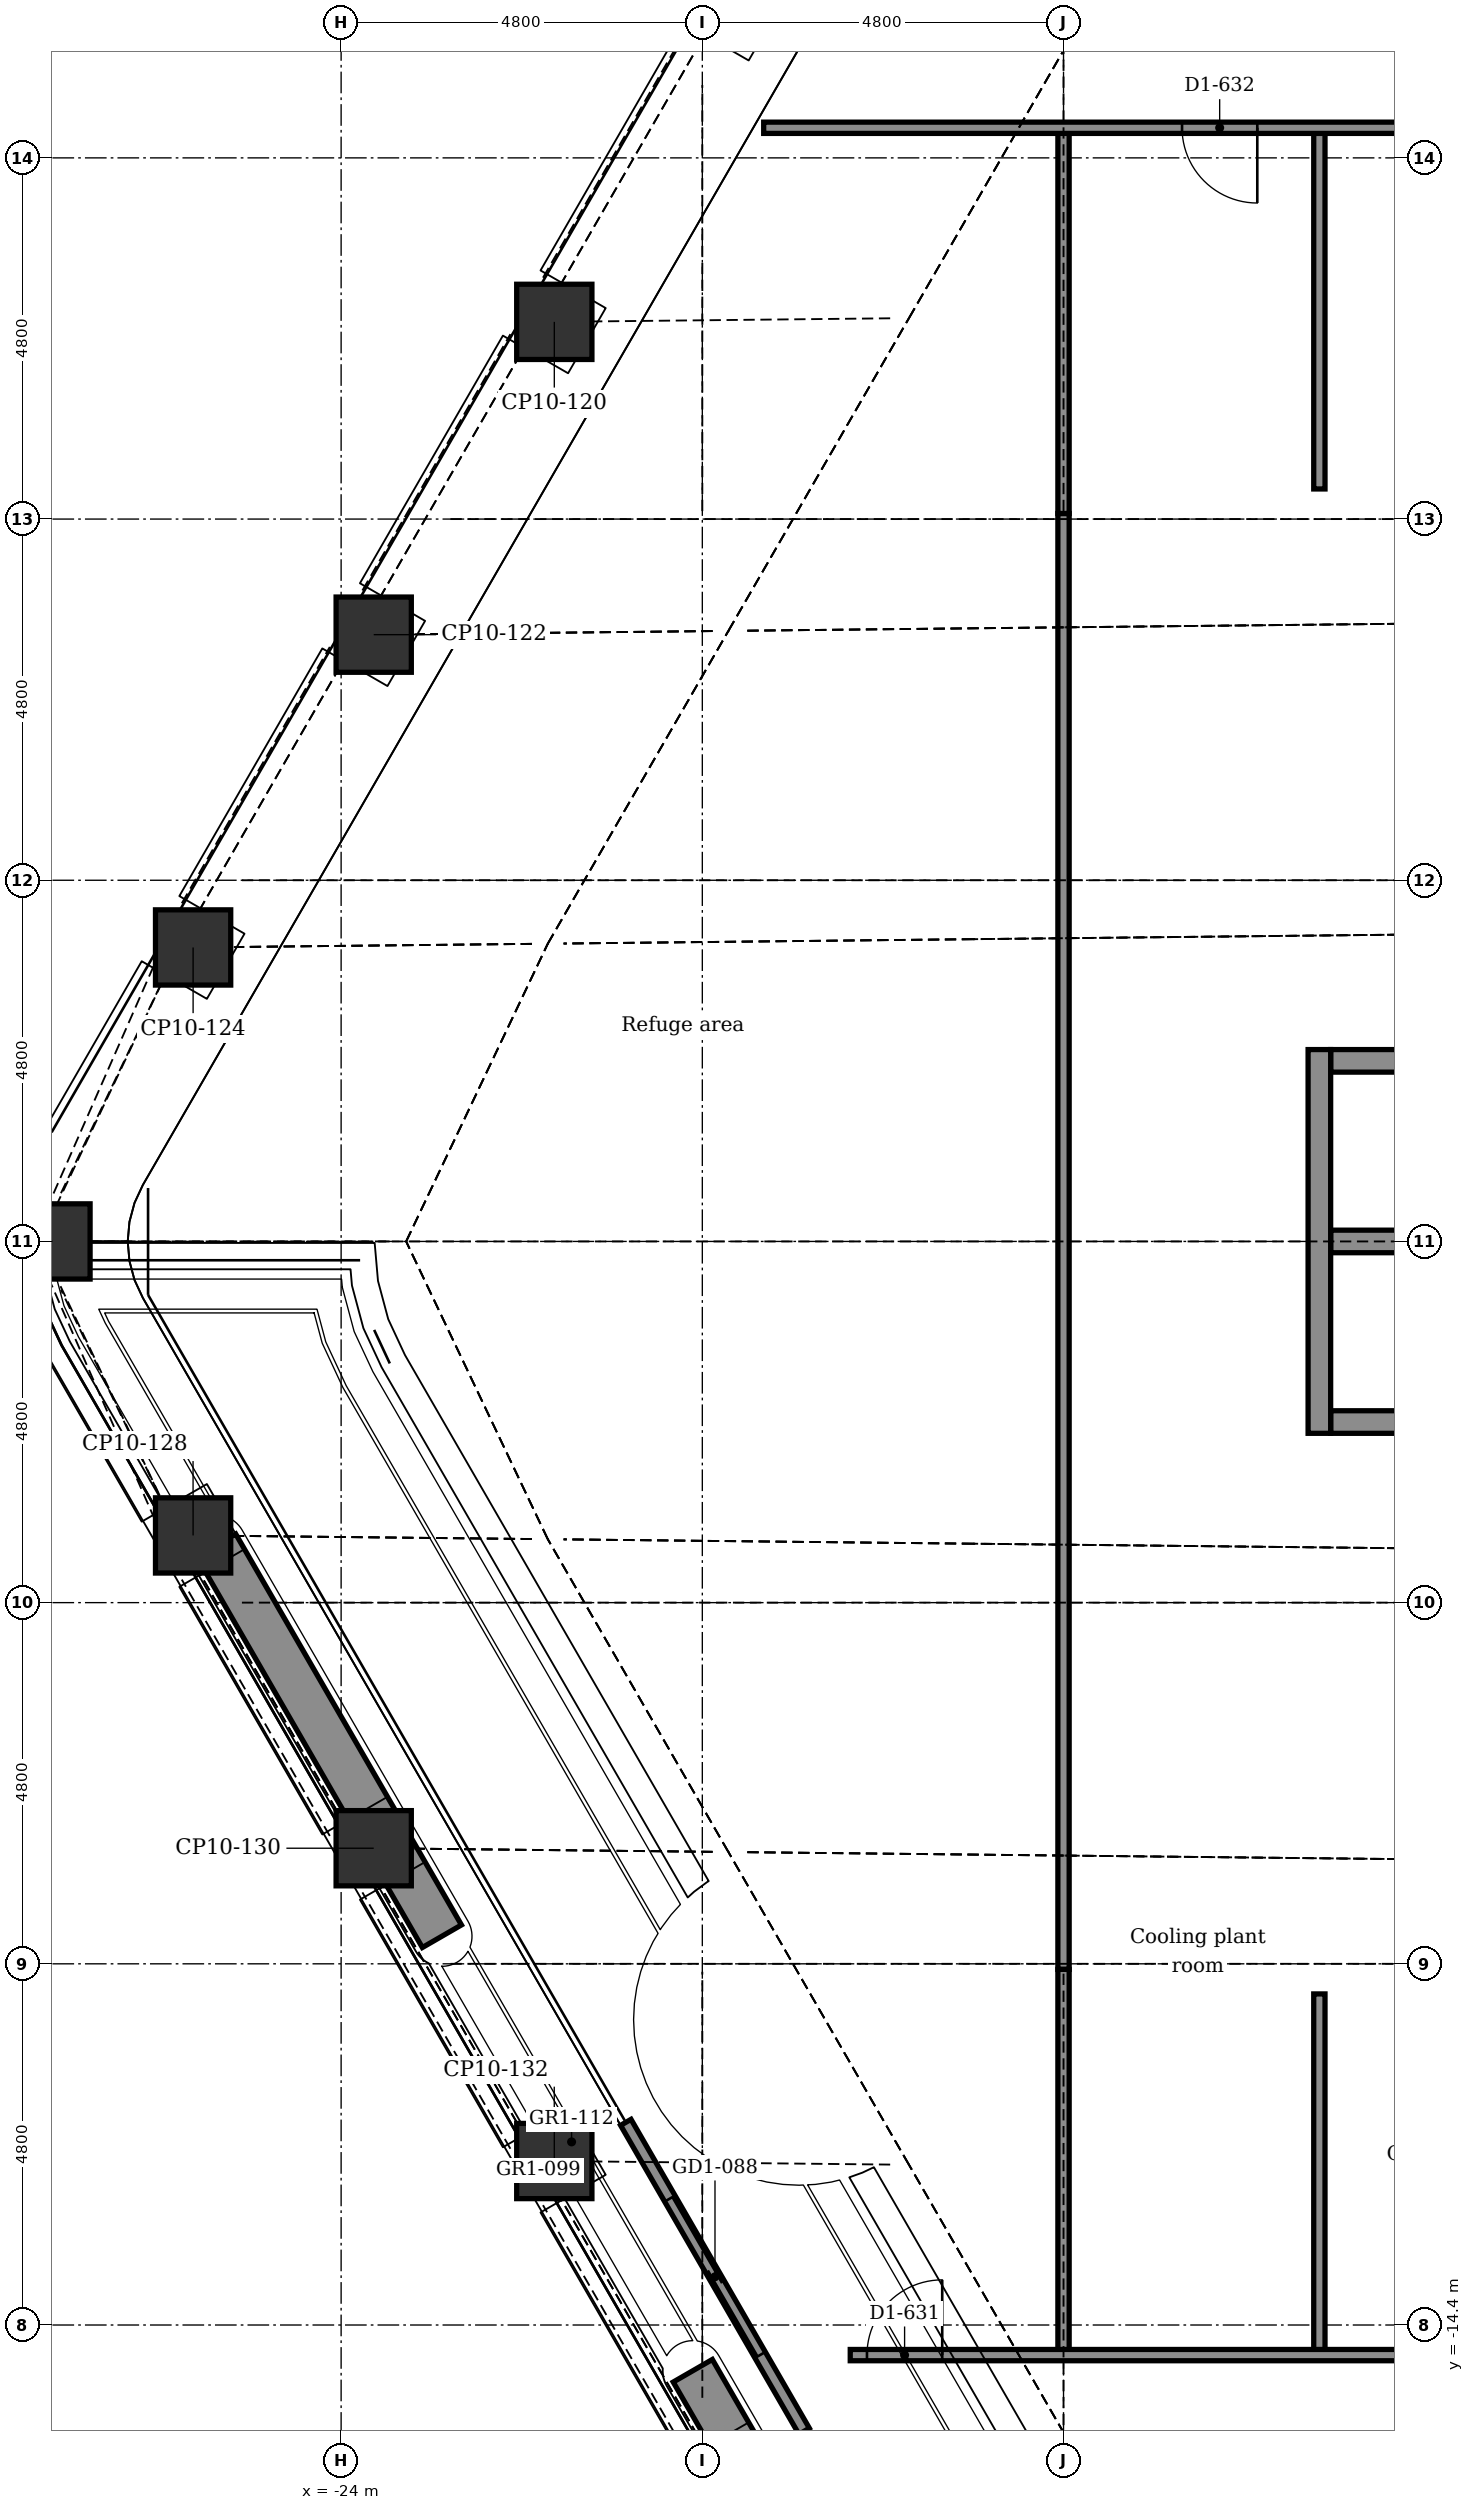
"""IFC4 building model, lengths in metres.
Left out: names, types, materials, properties, quantities, classifications, styles, units other than length and angle.
Written with IfcOpenShell. Run it as: python <this file> out.ifc"""

import sys

from ifc_helpers import new_model, si_unit, direction, frame, frame_2d, origin, origin_2d, place, context, subcontext, project, spatial, rectangle, extrude, element, fill, save


model = new_model("IFC4")
c1 = context("Model", 3, precision=1e-05, world=origin(), true_north=direction((0.0, 1.0)))
c2 = subcontext(c1, "Body", "Model", "MODEL_VIEW")
j1 = project(units=[si_unit("LENGTHUNIT", "METRE"), si_unit("PLANEANGLEUNIT", "RADIAN")], contexts=[c1])
p1 = place(None, origin())
s1 = spatial("IfcSite", under=j1, at=p1, CompositionType="ELEMENT")
p2 = place(p1, origin())
s2 = spatial("IfcBuilding", under=s1, at=p2, CompositionType="ELEMENT")
p3 = place(p2, frame((0.0, 0.0, 216.8)))
s3 = spatial("IfcBuildingStorey", under=s2, at=p3, CompositionType="ELEMENT", Elevation=216.8)
for number, where, z_axis, x_axis in (
    (1, (-18.767, -16.378, -0.3), (0.0, 0.0, 1.0), (0.866, 0.5, 0.0)),
    (2, (-21.167, -12.221, -0.3), (0.0, 0.0, 1.0), (0.866, 0.5, 0.0)),
    (3, (-23.567, -8.064, -0.3), (0.0, 0.0, 1.0), (0.866, 0.5, 0.0)),
    (4, (-25.967, -3.907, -0.3), (0.0, 0.0, 1.0), (0.866, 0.5, 0.0)),
    (5, (-27.836, 0.0, -0.3), (0.0, 0.0, 1.0), (1.0, 0.0, 0.0)),
    (6, (-25.967, 3.907, -0.3), (0.0, 0.0, 1.0), (0.5, 0.866, 0.0)),
    (7, (-23.567, 8.064, -0.3), (0.0, 0.0, 1.0), (0.5, 0.866, 0.0)),
    (8, (-21.167, 12.221, -0.3), (0.0, 0.0, 1.0), (0.5, 0.866, 0.0)),
    (9, (-18.767, 16.378, -0.3), (0.0, 0.0, 1.0), (0.5, 0.866, 0.0)),
):
    element("IfcColumn", number, at=place(p3, frame(where, z_axis=z_axis, x_axis=x_axis)), inside=s3, PredefinedType="COLUMN", context=c2, shape_type="SweptSolid", body=[
        extrude(rectangle(XDim=1.0, YDim=1.0, at=origin_2d()), origin(), (0.0, 0.0, 1.0), 6.15),
    ])
p4 = place(p3, frame((-10.85, -2.4, -0.3), z_axis=(0.0, 0.0, 1.0), x_axis=(1.0, 0.0, 0.0)))
e10 = element("IfcWall", 10, at=p4, inside=s3, PredefinedType="STANDARD", context=c2, shape_type="SweptSolid", body=[
    extrude(rectangle(XDim=1.1, YDim=0.3, at=frame_2d((0.55, 0.0))), origin(), (0.0, 0.0, 1.0), 6.15),
])
p5 = place(p3, frame((-10.85, 0.0, -0.3), z_axis=(0.0, 0.0, 1.0), x_axis=(1.0, 0.0, 0.0)))
e11 = element("IfcWall", 11, at=p5, inside=s3, PredefinedType="STANDARD", context=c2, shape_type="SweptSolid", body=[
    extrude(rectangle(XDim=3.3, YDim=0.3, at=frame_2d((1.65, 0.0))), origin(), (0.0, 0.0, 1.0), 6.15),
])
p6 = place(p3, frame((-10.85, 2.4, -0.3), z_axis=(0.0, 0.0, 1.0), x_axis=(1.0, 0.0, 0.0)))
e12 = element("IfcWall", 12, at=p6, inside=s3, PredefinedType="STANDARD", context=c2, shape_type="SweptSolid", body=[
    extrude(rectangle(XDim=1.1, YDim=0.3, at=frame_2d((0.55, 0.0))), origin(), (0.0, 0.0, 1.0), 6.15),
])
p7 = place(p3, frame((-11.0, -2.55, -0.3), z_axis=(0.0, 0.0, 1.0), x_axis=(0.0, 1.0, 0.0)))
e13 = element("IfcWall", 13, at=p7, inside=s3, PredefinedType="STANDARD", context=c2, shape_type="SweptSolid", body=[
    extrude(rectangle(XDim=5.1, YDim=0.3, at=frame_2d((2.55, 0.0))), origin(), (0.0, 0.0, 1.0), 6.15),
])
p8 = place(p3, frame((-17.847, -15.812, 0.0), z_axis=(0.0, 0.0, 1.0), x_axis=(-0.5000167099, 0.866015756104, 0.0)))
e14 = element("IfcWall", 14, at=p8, inside=s3, PredefinedType="PARTITIONING", context=c2, shape_type="SweptSolid", body=[
    extrude(rectangle(XDim=4.74, YDim=0.16, at=frame_2d((2.37, 0.0))), origin(), (0.0, 0.0, 1.0), 5.7),
])
p9 = place(p8, frame((1.17, 0.0, 0.0)))
e15 = element("IfcOpeningElement", 15, at=p9, cuts=e14, PredefinedType="OPENING", context=c2, shape_type="SweptSolid", body=[
    extrude(rectangle(XDim=2.4, YDim=2.4, at=frame_2d((1.2, 1.2))), frame((0.0, 0.09, 0.0), z_axis=(0.0, -1.0, 0.0), x_axis=(1.0, 0.0, 0.0)), (0.0, 0.0, 1.0), 0.18),
])
for number, where, z_axis, x_axis in (
    (16, (-16.327, -20.204, 6.0), (0.0, 0.0, 1.0), (-0.5, 0.866, 0.0)),
    (17, (-22.661, -9.233, 6.0), (0.0, 0.0, 1.0), (-0.5, 0.866, 0.0)),
):
    element("IfcWall", number, at=place(p3, frame(where, z_axis=z_axis, x_axis=x_axis)), inside=s3, PredefinedType="USERDEFINED", context=c2, shape_type="SweptSolid", body=[
        extrude(rectangle(XDim=6.0, YDim=0.6, at=frame_2d((3.0, 0.0))), origin(), (0.0, 0.0, 1.0), 0.7),
    ])
for number, where, z_axis, x_axis in (
    (18, (-11.0, -14.8, 0.0), (0.0, 0.0, 1.0), (0.0, 1.0, 0.0)),
    (19, (-11.0, 10.0, 0.0), (0.0, 0.0, 1.0), (0.0, 1.0, 0.0)),
):
    element("IfcWall", number, at=place(p3, frame(where, z_axis=z_axis, x_axis=x_axis)), inside=s3, PredefinedType="PARTITIONING", context=c2, shape_type="SweptSolid", body=[
        extrude(rectangle(XDim=4.8, YDim=0.15, at=frame_2d((2.4, 0.0))), origin(), (0.0, 0.0, 1.0), 5.85),
    ])
p10 = place(p3, frame((-14.4, -9.674, 0.0), z_axis=(0.0, 0.0, 1.0), x_axis=(0.0, 1.0, 0.0)))
e20 = element("IfcWall", 20, at=p10, inside=s3, PredefinedType="PARTITIONING", context=c2, shape_type="SweptSolid", body=[
    extrude(rectangle(XDim=19.348, YDim=0.15, at=frame_2d((9.674, 0.0))), origin(), (0.0, 0.0, 1.0), 5.85),
])
for number, where, z_axis, x_axis in (
    (21, (-14.4, -14.8, 0.0), (0.0, 0.0, 1.0), (0.0, 1.0, 0.0)),
    (22, (-14.4, 9.674, 0.0), (0.0, 0.0, 1.0), (0.0, 1.0, 0.0)),
):
    element("IfcWall", number, at=place(p3, frame(where, z_axis=z_axis, x_axis=x_axis)), inside=s3, PredefinedType="PARTITIONING", context=c2, shape_type="SweptSolid", body=[
        extrude(rectangle(XDim=5.126, YDim=0.15, at=frame_2d((2.563, 0.0))), origin(), (0.0, 0.0, 1.0), 5.54),
    ])
p11 = place(p3, frame((-17.234, -14.8, 0.0), z_axis=(0.0, 0.0, 1.0), x_axis=(1.0, 0.0, 0.0)))
e23 = element("IfcWall", 23, at=p11, inside=s3, PredefinedType="PARTITIONING", context=c2, shape_type="SweptSolid", body=[
    extrude(rectangle(XDim=19.634, YDim=0.15, at=frame_2d((9.817, 0.0))), origin(), (0.0, 0.0, 1.0), 5.7),
])
p12 = place(p11, frame((8.834, 0.0, 0.0)))
e24 = element("IfcOpeningElement", 24, at=p12, cuts=e23, PredefinedType="OPENING", context=c2, shape_type="SweptSolid", body=[
    extrude(rectangle(XDim=1.0, YDim=2.1, at=frame_2d((0.5, 1.05))), frame((0.0, 0.085, 0.0), z_axis=(0.0, -1.0, 0.0), x_axis=(1.0, 0.0, 0.0)), (0.0, 0.0, 1.0), 0.17),
])
p13 = place(p11, frame((15.059, 0.0, 0.0)))
e25 = element("IfcOpeningElement", 25, at=p13, cuts=e23, PredefinedType="OPENING", context=c2, shape_type="SweptSolid", body=[
    extrude(rectangle(XDim=1.0, YDim=2.1, at=frame_2d((0.5, 1.05))), frame((0.0, 0.085, 0.0), z_axis=(0.0, -1.0, 0.0), x_axis=(1.0, 0.0, 0.0)), (0.0, 0.0, 1.0), 0.17),
])
p14 = place(p11, frame((17.859, 0.0, 0.0)))
e26 = element("IfcOpeningElement", 26, at=p14, cuts=e23, PredefinedType="OPENING", context=c2, shape_type="SweptSolid", body=[
    extrude(rectangle(XDim=1.0, YDim=2.1, at=frame_2d((0.5, 1.05))), frame((0.0, 0.085, 0.0), z_axis=(0.0, -1.0, 0.0), x_axis=(1.0, 0.0, 0.0)), (0.0, 0.0, 1.0), 0.17),
])
p15 = place(p11, frame((0.222, 0.0, 0.0)))
e27 = element("IfcOpeningElement", 27, at=p15, cuts=e23, PredefinedType="OPENING", context=c2, shape_type="SweptSolid", body=[
    extrude(rectangle(XDim=1.0, YDim=2.1, at=frame_2d((0.5, 1.05))), frame((0.0, 0.085, 0.0), z_axis=(0.0, -1.0, 0.0), x_axis=(1.0, 0.0, 0.0)), (0.0, 0.0, 1.0), 0.17),
])
p16 = place(p3, frame((-18.385, 14.8, 0.0), z_axis=(0.0, 0.0, 1.0), x_axis=(1.0, 0.0, 0.0)))
e28 = element("IfcWall", 28, at=p16, inside=s3, PredefinedType="PARTITIONING", context=c2, shape_type="SweptSolid", body=[
    extrude(rectangle(XDim=11.784, YDim=0.15, at=frame_2d((5.892, 0.0))), origin(), (0.0, 0.0, 1.0), 5.85),
])
p17 = place(p16, frame((5.56, 0.0, 0.0)))
e29 = element("IfcOpeningElement", 29, at=p17, cuts=e28, PredefinedType="OPENING", context=c2, shape_type="SweptSolid", body=[
    extrude(rectangle(XDim=1.0, YDim=2.1, at=frame_2d((0.5, 1.05))), frame((0.0, 0.085, 0.0), z_axis=(0.0, -1.0, 0.0), x_axis=(1.0, 0.0, 0.0)), (0.0, 0.0, 1.0), 0.17),
])
p18 = place(p9, origin())
e30 = element("IfcDoor", 30, at=p18, inside=s3, OperationType="DOUBLE_DOOR_SLIDING", PredefinedType="DOOR", context=c2, shape_type="SweptSolid", body=[
    extrude(rectangle(XDim=2.4, YDim=2.4, at=frame_2d((1.2, 1.2))), frame((0.0, 0.025, 0.0), z_axis=(0.0, -1.0, 0.0), x_axis=(1.0, 0.0, 0.0)), (0.0, 0.0, 1.0), 0.05),
])
fill(e15, e30)
p19 = place(p15, origin())
e31 = element("IfcDoor", 31, at=p19, inside=s3, OperationType="SINGLE_SWING_RIGHT", PredefinedType="DOOR", context=c2, shape_type="SweptSolid", body=[
    extrude(rectangle(XDim=1.0, YDim=2.1, at=frame_2d((0.5, 1.05))), frame((0.0, 0.025, 0.0), z_axis=(0.0, -1.0, 0.0), x_axis=(1.0, 0.0, 0.0)), (0.0, 0.0, 1.0), 0.05),
])
fill(e27, e31)
p20 = place(p17, frame((1.0, 0.0, 0.0), z_axis=(0.0, 0.0, 1.0), x_axis=(-1.0, 0.0, 0.0)))
e32 = element("IfcDoor", 32, at=p20, inside=s3, OperationType="SINGLE_SWING_RIGHT", PredefinedType="DOOR", context=c2, shape_type="SweptSolid", body=[
    extrude(rectangle(XDim=1.0, YDim=2.1, at=frame_2d((0.5, 1.05))), frame((0.0, 0.025, 0.0), z_axis=(0.0, -1.0, 0.0), x_axis=(1.0, 0.0, 0.0)), (0.0, 0.0, 1.0), 0.05),
])
fill(e29, e32)
save(model, sys.argv[1])
